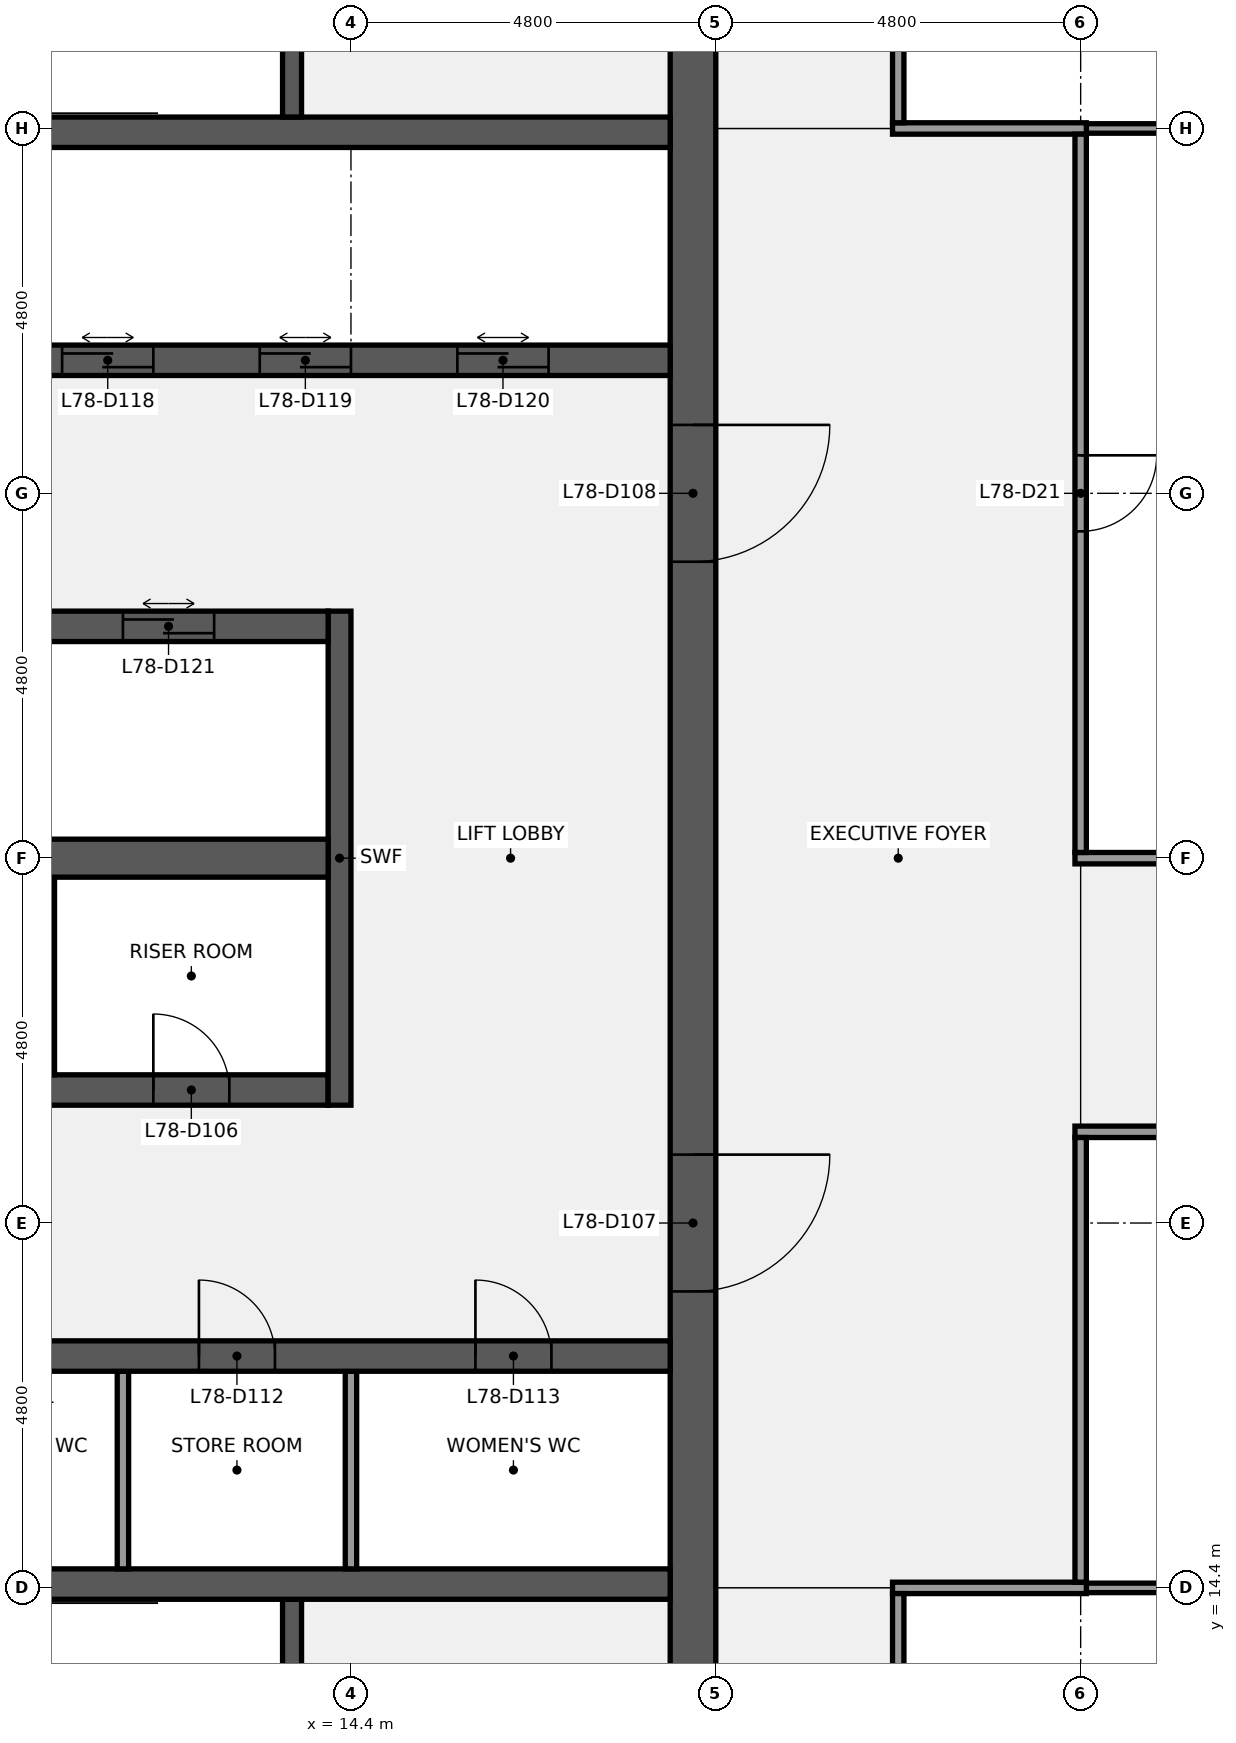
"""IFC4 building model, lengths in metres.
Left out: names, types, materials, properties, quantities, classifications, styles, units other than length and angle.
Written with IfcOpenShell. Run it as: python <this file> out.ifc"""

import sys

from ifc_helpers import new_model, si_unit, direction, frame, frame_2d, origin, place, context, subcontext, project, spatial, rectangle, extrude, element, fill, save


model = new_model("IFC4")
c1 = context("Model", 3, precision=1e-05, world=origin(), true_north=direction((0.0, 1.0)))
c2 = subcontext(c1, "Body", "Model", "MODEL_VIEW")
j1 = project(units=[si_unit("LENGTHUNIT", "METRE"), si_unit("PLANEANGLEUNIT", "RADIAN")], contexts=[c1])
p1 = place(None, origin())
s1 = spatial("IfcSite", under=j1, at=p1, CompositionType="ELEMENT")
p2 = place(p1, origin())
s2 = spatial("IfcBuilding", under=s1, at=p2, CompositionType="ELEMENT")
p3 = place(p2, frame((0.0, 0.0, 350.3)))
s3 = spatial("IfcBuildingStorey", under=s2, at=p3, CompositionType="ELEMENT", Elevation=350.3)
p4 = place(p3, frame((18.9, 38.4, 0.0), z_axis=(0.0, 0.0, 1.0), x_axis=(0.0, -1.0, 0.0)))
e1 = element("IfcWall", 1, at=p4, inside=s3, PredefinedType="SHEAR", context=c2, shape_type="SweptSolid", body=[
    extrude(rectangle(XDim=28.8, YDim=0.6, at=frame_2d((14.4, 0.0))), origin(), (0.0, 0.0, 1.0), 3.75),
])
p5 = place(p4, frame((18.3, 0.0, 0.0)))
e2 = element("IfcOpeningElement", 2, at=p5, cuts=e1, PredefinedType="OPENING", context=c2, shape_type="SweptSolid", body=[
    extrude(rectangle(XDim=1.8, YDim=2.1, at=frame_2d((0.9, 1.05))), frame((0.0, 0.31, 0.0), z_axis=(0.0, -1.0, 0.0), x_axis=(1.0, 0.0, 0.0)), (0.0, 0.0, 1.0), 0.62),
])
p6 = place(p4, frame((8.7, 0.0, 0.0)))
e3 = element("IfcOpeningElement", 3, at=p6, cuts=e1, PredefinedType="OPENING", context=c2, shape_type="SweptSolid", body=[
    extrude(rectangle(XDim=1.8, YDim=2.1, at=frame_2d((0.9, 1.05))), frame((0.0, 0.31, 0.0), z_axis=(0.0, -1.0, 0.0), x_axis=(1.0, 0.0, 0.0)), (0.0, 0.0, 1.0), 0.62),
])
p7 = place(p3, frame((13.625, 10.8, 0.0), z_axis=(0.0, 0.0, 1.0), x_axis=(0.0, 1.0, 0.0)))
e4 = element("IfcWall", 4, at=p7, inside=s3, PredefinedType="SHEAR", context=c2, shape_type="SweptSolid", body=[
    extrude(rectangle(XDim=3.45, YDim=0.25, at=frame_2d((1.725, 0.0))), origin(), (0.0, 0.0, 1.0), 3.75),
])
p8 = place(p7, frame((1.175, 0.0, 0.0)))
e5 = element("IfcOpeningElement", 5, at=p8, cuts=e4, PredefinedType="OPENING", context=c2, shape_type="SweptSolid", body=[
    extrude(rectangle(XDim=1.1, YDim=2.1, at=frame_2d((0.55, 1.05))), frame((0.0, 0.135, 0.0), z_axis=(0.0, -1.0, 0.0), x_axis=(1.0, 0.0, 0.0)), (0.0, 0.0, 1.0), 0.27),
])
p9 = place(p3, frame((0.6, 14.45, 0.0), z_axis=(0.0, 0.0, 1.0), x_axis=(1.0, 0.0, 0.0)))
e6 = element("IfcWall", 6, at=p9, inside=s3, PredefinedType="SHEAR", context=c2, shape_type="SweptSolid", body=[
    extrude(rectangle(XDim=18.0, YDim=0.4, at=frame_2d((9.0, 0.0))), origin(), (0.0, 0.0, 1.0), 3.75),
])
for number, where, z_axis, x_axis in (
    (7, (11.4, 14.65, 0.0), (0.0, 0.0, 1.0), (0.0, 1.0, 0.0)),
    (8, (14.4, 14.65, 0.0), (0.0, 0.0, 1.0), (0.0, 1.0, 0.0)),
):
    element("IfcWall", number, at=place(p3, frame(where, z_axis=z_axis, x_axis=x_axis)), inside=s3, PredefinedType="PARTITIONING", context=c2, shape_type="SweptSolid", body=[
        extrude(rectangle(XDim=2.6, YDim=0.15, at=frame_2d((1.3, 0.0))), origin(), (0.0, 0.0, 1.0), 3.75),
    ])
p10 = place(p3, frame((0.6, 17.45, 0.0), z_axis=(0.0, 0.0, 1.0), x_axis=(1.0, 0.0, 0.0)))
e9 = element("IfcWall", 9, at=p10, inside=s3, PredefinedType="SHEAR", context=c2, shape_type="SweptSolid", body=[
    extrude(rectangle(XDim=18.0, YDim=0.4, at=frame_2d((9.0, 0.0))), origin(), (0.0, 0.0, 1.0), 3.75),
])
p11 = place(p10, frame((0.962, 0.0, 0.0)))
e10 = element("IfcOpeningElement", 10, at=p11, cuts=e9, PredefinedType="OPENING", context=c2, shape_type="SweptSolid", body=[
    extrude(rectangle(XDim=1.0, YDim=2.1, at=frame_2d((0.5, 1.05))), frame((0.0, 0.21, 0.0), z_axis=(0.0, -1.0, 0.0), x_axis=(1.0, 0.0, 0.0)), (0.0, 0.0, 1.0), 0.42),
])
p12 = place(p10, frame((4.9, 0.0, 0.0)))
e11 = element("IfcOpeningElement", 11, at=p12, cuts=e9, PredefinedType="OPENING", context=c2, shape_type="SweptSolid", body=[
    extrude(rectangle(XDim=1.0, YDim=2.1, at=frame_2d((0.5, 1.05))), frame((0.0, 0.21, 0.0), z_axis=(0.0, -1.0, 0.0), x_axis=(1.0, 0.0, 0.0)), (0.0, 0.0, 1.0), 0.42),
])
p13 = place(p10, frame((8.8, 0.0, 0.0)))
e12 = element("IfcOpeningElement", 12, at=p13, cuts=e9, PredefinedType="OPENING", context=c2, shape_type="SweptSolid", body=[
    extrude(rectangle(XDim=1.0, YDim=2.1, at=frame_2d((0.5, 1.05))), frame((0.0, 0.21, 0.0), z_axis=(0.0, -1.0, 0.0), x_axis=(1.0, 0.0, 0.0)), (0.0, 0.0, 1.0), 0.42),
])
p14 = place(p10, frame((11.8, 0.0, 0.0)))
e13 = element("IfcOpeningElement", 13, at=p14, cuts=e9, PredefinedType="OPENING", context=c2, shape_type="SweptSolid", body=[
    extrude(rectangle(XDim=1.0, YDim=2.1, at=frame_2d((0.5, 1.05))), frame((0.0, 0.21, 0.0), z_axis=(0.0, -1.0, 0.0), x_axis=(1.0, 0.0, 0.0)), (0.0, 0.0, 1.0), 0.42),
])
p15 = place(p10, frame((15.438, 0.0, 0.0)))
e14 = element("IfcOpeningElement", 14, at=p15, cuts=e9, PredefinedType="OPENING", context=c2, shape_type="SweptSolid", body=[
    extrude(rectangle(XDim=1.0, YDim=2.1, at=frame_2d((0.5, 1.05))), frame((0.0, 0.21, 0.0), z_axis=(0.0, -1.0, 0.0), x_axis=(1.0, 0.0, 0.0)), (0.0, 0.0, 1.0), 0.42),
])
p16 = place(p3, frame((0.6, 20.95, 0.0), z_axis=(0.0, 0.0, 1.0), x_axis=(1.0, 0.0, 0.0)))
e15 = element("IfcWall", 15, at=p16, inside=s3, PredefinedType="SHEAR", context=c2, shape_type="SweptSolid", body=[
    extrude(rectangle(XDim=13.5, YDim=0.4, at=frame_2d((6.75, 0.0))), origin(), (0.0, 0.0, 1.0), 3.75),
])
p17 = place(p16, frame((6.25, 0.0, 0.0)))
e16 = element("IfcOpeningElement", 16, at=p17, cuts=e15, PredefinedType="OPENING", context=c2, shape_type="SweptSolid", body=[
    extrude(rectangle(XDim=1.1, YDim=2.1, at=frame_2d((0.55, 1.05))), frame((0.0, 0.21, 0.0), z_axis=(0.0, -1.0, 0.0), x_axis=(1.0, 0.0, 0.0)), (0.0, 0.0, 1.0), 0.42),
])
p18 = place(p16, frame((11.2, 0.0, 0.0)))
e17 = element("IfcOpeningElement", 17, at=p18, cuts=e15, PredefinedType="OPENING", context=c2, shape_type="SweptSolid", body=[
    extrude(rectangle(XDim=1.0, YDim=2.1, at=frame_2d((0.5, 1.05))), frame((0.0, 0.21, 0.0), z_axis=(0.0, -1.0, 0.0), x_axis=(1.0, 0.0, 0.0)), (0.0, 0.0, 1.0), 0.42),
])
p19 = place(p3, frame((14.25, 20.75, 0.0), z_axis=(0.0, 0.0, 1.0), x_axis=(0.0, 1.0, 0.0)))
e18 = element("IfcWall", 18, at=p19, inside=s3, PredefinedType="SHEAR", context=c2, shape_type="SweptSolid", body=[
    extrude(rectangle(XDim=6.5, YDim=0.3, at=frame_2d((3.25, 0.0))), origin(), (0.0, 0.0, 1.0), 3.75),
])
p20 = place(p3, frame((10.3, 21.15, 0.0), z_axis=(0.0, 0.0, 1.0), x_axis=(0.0, 1.0, 0.0)))
e19 = element("IfcWall", 19, at=p20, inside=s3, PredefinedType="SHEAR", context=c2, shape_type="SweptSolid", body=[
    extrude(rectangle(XDim=2.6, YDim=0.4, at=frame_2d((1.3, 0.0))), origin(), (0.0, 0.0, 1.0), 3.75),
])
p21 = place(p3, frame((0.6, 24.0, 0.0), z_axis=(0.0, 0.0, 1.0), x_axis=(1.0, 0.0, 0.0)))
e20 = element("IfcWall", 20, at=p21, inside=s3, PredefinedType="SHEAR", context=c2, shape_type="SweptSolid", body=[
    extrude(rectangle(XDim=13.5, YDim=0.5, at=frame_2d((6.75, 0.0))), origin(), (0.0, 0.0, 1.0), 3.75),
])
p22 = place(p3, frame((0.6, 27.05, 0.0), z_axis=(0.0, 0.0, 1.0), x_axis=(1.0, 0.0, 0.0)))
e21 = element("IfcWall", 21, at=p22, inside=s3, PredefinedType="SHEAR", context=c2, shape_type="SweptSolid", body=[
    extrude(rectangle(XDim=13.5, YDim=0.4, at=frame_2d((6.75, 0.0))), origin(), (0.0, 0.0, 1.0), 3.75),
])
p23 = place(p22, frame((3.85, 0.0, 0.0)))
e22 = element("IfcOpeningElement", 22, at=p23, cuts=e21, PredefinedType="OPENING", context=c2, shape_type="SweptSolid", body=[
    extrude(rectangle(XDim=1.0, YDim=2.1, at=frame_2d((0.5, 1.05))), frame((0.0, 0.21, 0.0), z_axis=(0.0, -1.0, 0.0), x_axis=(1.0, 0.0, 0.0)), (0.0, 0.0, 1.0), 0.42),
])
p24 = place(p22, frame((10.8, 0.0, 0.0)))
e23 = element("IfcOpeningElement", 23, at=p24, cuts=e21, PredefinedType="OPENING", context=c2, shape_type="SweptSolid", body=[
    extrude(rectangle(XDim=1.2, YDim=2.1, at=frame_2d((0.6, 1.05))), frame((0.0, 0.21, 0.0), z_axis=(0.0, -1.0, 0.0), x_axis=(1.0, 0.0, 0.0)), (0.0, 0.0, 1.0), 0.42),
])
p25 = place(p3, frame((0.6, 30.55, 0.0), z_axis=(0.0, 0.0, 1.0), x_axis=(1.0, 0.0, 0.0)))
e24 = element("IfcWall", 24, at=p25, inside=s3, PredefinedType="SHEAR", context=c2, shape_type="SweptSolid", body=[
    extrude(rectangle(XDim=18.0, YDim=0.4, at=frame_2d((9.0, 0.0))), origin(), (0.0, 0.0, 1.0), 3.75),
])
p26 = place(p25, frame((1.6, 0.0, 0.0)))
e25 = element("IfcOpeningElement", 25, at=p26, cuts=e24, PredefinedType="OPENING", context=c2, shape_type="SweptSolid", body=[
    extrude(rectangle(XDim=1.2, YDim=2.1, at=frame_2d((0.6, 1.05))), frame((0.0, 0.21, 0.0), z_axis=(0.0, -1.0, 0.0), x_axis=(1.0, 0.0, 0.0)), (0.0, 0.0, 1.0), 0.42),
])
p27 = place(p25, frame((4.2, 0.0, 0.0)))
e26 = element("IfcOpeningElement", 26, at=p27, cuts=e24, PredefinedType="OPENING", context=c2, shape_type="SweptSolid", body=[
    extrude(rectangle(XDim=1.2, YDim=2.1, at=frame_2d((0.6, 1.05))), frame((0.0, 0.21, 0.0), z_axis=(0.0, -1.0, 0.0), x_axis=(1.0, 0.0, 0.0)), (0.0, 0.0, 1.0), 0.42),
])
p28 = place(p25, frame((6.8, 0.0, 0.0)))
e27 = element("IfcOpeningElement", 27, at=p28, cuts=e24, PredefinedType="OPENING", context=c2, shape_type="SweptSolid", body=[
    extrude(rectangle(XDim=1.2, YDim=2.1, at=frame_2d((0.6, 1.05))), frame((0.0, 0.21, 0.0), z_axis=(0.0, -1.0, 0.0), x_axis=(1.0, 0.0, 0.0)), (0.0, 0.0, 1.0), 0.42),
])
p29 = place(p25, frame((10.0, 0.0, 0.0)))
e28 = element("IfcOpeningElement", 28, at=p29, cuts=e24, PredefinedType="OPENING", context=c2, shape_type="SweptSolid", body=[
    extrude(rectangle(XDim=1.2, YDim=2.1, at=frame_2d((0.6, 1.05))), frame((0.0, 0.21, 0.0), z_axis=(0.0, -1.0, 0.0), x_axis=(1.0, 0.0, 0.0)), (0.0, 0.0, 1.0), 0.42),
])
p30 = place(p25, frame((12.6, 0.0, 0.0)))
e29 = element("IfcOpeningElement", 29, at=p30, cuts=e24, PredefinedType="OPENING", context=c2, shape_type="SweptSolid", body=[
    extrude(rectangle(XDim=1.2, YDim=2.1, at=frame_2d((0.6, 1.05))), frame((0.0, 0.21, 0.0), z_axis=(0.0, -1.0, 0.0), x_axis=(1.0, 0.0, 0.0)), (0.0, 0.0, 1.0), 0.42),
])
p31 = place(p25, frame((15.2, 0.0, 0.0)))
e30 = element("IfcOpeningElement", 30, at=p31, cuts=e24, PredefinedType="OPENING", context=c2, shape_type="SweptSolid", body=[
    extrude(rectangle(XDim=1.2, YDim=2.1, at=frame_2d((0.6, 1.05))), frame((0.0, 0.21, 0.0), z_axis=(0.0, -1.0, 0.0), x_axis=(1.0, 0.0, 0.0)), (0.0, 0.0, 1.0), 0.42),
])
p32 = place(p3, frame((0.6, 33.55, 0.0), z_axis=(0.0, 0.0, 1.0), x_axis=(1.0, 0.0, 0.0)))
e31 = element("IfcWall", 31, at=p32, inside=s3, PredefinedType="SHEAR", context=c2, shape_type="SweptSolid", body=[
    extrude(rectangle(XDim=18.0, YDim=0.4, at=frame_2d((9.0, 0.0))), origin(), (0.0, 0.0, 1.0), 3.75),
])
p33 = place(p3, frame((13.625, 33.75, 0.0), z_axis=(0.0, 0.0, 1.0), x_axis=(0.0, 1.0, 0.0)))
e32 = element("IfcWall", 32, at=p33, inside=s3, PredefinedType="SHEAR", context=c2, shape_type="SweptSolid", body=[
    extrude(rectangle(XDim=3.45, YDim=0.25, at=frame_2d((1.725, 0.0))), origin(), (0.0, 0.0, 1.0), 3.75),
])
p34 = place(p33, frame((1.175, 0.0, 0.0)))
e33 = element("IfcOpeningElement", 33, at=p34, cuts=e32, PredefinedType="OPENING", context=c2, shape_type="SweptSolid", body=[
    extrude(rectangle(XDim=1.1, YDim=2.1, at=frame_2d((0.55, 1.05))), frame((0.0, 0.135, 0.0), z_axis=(0.0, -1.0, 0.0), x_axis=(1.0, 0.0, 0.0)), (0.0, 0.0, 1.0), 0.27),
])
p35 = place(p3, frame((24.075, 14.4, 0.0), z_axis=(0.0, 0.0, 1.0), x_axis=(1.0, 0.0, 0.0)))
e34 = element("IfcWall", 34, at=p35, inside=s3, PredefinedType="PARTITIONING", context=c2, shape_type="SweptSolid", body=[
    extrude(rectangle(XDim=9.6, YDim=0.125, at=frame_2d((4.8, 0.0))), origin(), (0.0, 0.0, 1.0), 2.759),
])
p36 = place(p3, frame((21.525, 14.4, 0.0), z_axis=(0.0, 0.0, 1.0), x_axis=(1.0, 0.0, 0.0)))
e35 = element("IfcWall", 35, at=p36, inside=s3, PredefinedType="PARTITIONING", context=c2, shape_type="SweptSolid", body=[
    extrude(rectangle(XDim=2.55, YDim=0.15, at=frame_2d((1.275, 0.0))), origin(), (0.0, 0.0, 1.0), 2.759),
])
p37 = place(p3, frame((23.925, 20.4, 0.0), z_axis=(0.0, 0.0, 1.0), x_axis=(1.0, 0.0, 0.0)))
e36 = element("IfcWall", 36, at=p37, inside=s3, PredefinedType="PARTITIONING", context=c2, shape_type="SweptSolid", body=[
    extrude(rectangle(XDim=9.75, YDim=0.15, at=frame_2d((4.875, 0.0))), origin(), (0.0, 0.0, 1.0), 2.759),
])
p38 = place(p37, frame((4.375, 0.0, 0.0)))
e37 = element("IfcOpeningElement", 37, at=p38, cuts=e36, PredefinedType="OPENING", context=c2, shape_type="SweptSolid", body=[
    extrude(rectangle(XDim=1.0, YDim=2.1, at=frame_2d((0.5, 1.05))), frame((0.0, 0.085, 0.0), z_axis=(0.0, -1.0, 0.0), x_axis=(1.0, 0.0, 0.0)), (0.0, 0.0, 1.0), 0.17),
])
p39 = place(p3, frame((23.925, 24.0, 0.0), z_axis=(0.0, 0.0, 1.0), x_axis=(1.0, 0.0, 0.0)))
e38 = element("IfcWall", 38, at=p39, inside=s3, PredefinedType="PARTITIONING", context=c2, shape_type="SweptSolid", body=[
    extrude(rectangle(XDim=9.75, YDim=0.15, at=frame_2d((4.875, 0.0))), origin(), (0.0, 0.0, 1.0), 2.759),
])
p40 = place(p3, frame((24.075, 33.6, 0.0), z_axis=(0.0, 0.0, 1.0), x_axis=(1.0, 0.0, 0.0)))
e39 = element("IfcWall", 39, at=p40, inside=s3, PredefinedType="PARTITIONING", context=c2, shape_type="SweptSolid", body=[
    extrude(rectangle(XDim=9.6, YDim=0.125, at=frame_2d((4.8, 0.0))), origin(), (0.0, 0.0, 1.0), 2.759),
])
p41 = place(p3, frame((21.525, 33.6, 0.0), z_axis=(0.0, 0.0, 1.0), x_axis=(1.0, 0.0, 0.0)))
e40 = element("IfcWall", 40, at=p41, inside=s3, PredefinedType="PARTITIONING", context=c2, shape_type="SweptSolid", body=[
    extrude(rectangle(XDim=2.55, YDim=0.15, at=frame_2d((1.275, 0.0))), origin(), (0.0, 0.0, 1.0), 2.759),
])
for number, where, z_axis, x_axis in (
    (41, (21.6, 9.675, 0.0), (0.0, 0.0, 1.0), (0.0, 1.0, 0.0)),
    (42, (21.6, 33.675, 0.0), (0.0, 0.0, 1.0), (0.0, 1.0, 0.0)),
):
    element("IfcWall", number, at=place(p3, frame(where, z_axis=z_axis, x_axis=x_axis)), inside=s3, PredefinedType="PARTITIONING", context=c2, shape_type="SweptSolid", body=[
        extrude(rectangle(XDim=4.65, YDim=0.15, at=frame_2d((2.325, 0.0))), origin(), (0.0, 0.0, 1.0), 2.759),
    ])
p42 = place(p3, frame((24.0, 14.475, 0.0), z_axis=(0.0, 0.0, 1.0), x_axis=(0.0, 1.0, 0.0)))
e43 = element("IfcWall", 43, at=p42, inside=s3, PredefinedType="PARTITIONING", context=c2, shape_type="SweptSolid", body=[
    extrude(rectangle(XDim=5.85, YDim=0.15, at=frame_2d((2.925, 0.0))), origin(), (0.0, 0.0, 1.0), 2.759),
])
p43 = place(p3, frame((24.0, 24.075, 0.0), z_axis=(0.0, 0.0, 1.0), x_axis=(0.0, 1.0, 0.0)))
e44 = element("IfcWall", 44, at=p43, inside=s3, PredefinedType="PARTITIONING", context=c2, shape_type="SweptSolid", body=[
    extrude(rectangle(XDim=9.45, YDim=0.15, at=frame_2d((4.725, 0.0))), origin(), (0.0, 0.0, 1.0), 2.759),
])
p44 = place(p43, frame((4.225, 0.0, 0.0)))
e45 = element("IfcOpeningElement", 45, at=p44, cuts=e44, PredefinedType="OPENING", context=c2, shape_type="SweptSolid", body=[
    extrude(rectangle(XDim=1.0, YDim=2.1, at=frame_2d((0.5, 1.05))), frame((0.0, 0.085, 0.0), z_axis=(0.0, -1.0, 0.0), x_axis=(1.0, 0.0, 0.0)), (0.0, 0.0, 1.0), 0.17),
])
p45 = place(p18, origin())
e46 = element("IfcDoor", 46, at=p45, inside=s3, OperationType="SINGLE_SWING_LEFT", PredefinedType="DOOR", context=c2, shape_type="SweptSolid", body=[
    extrude(rectangle(XDim=1.0, YDim=2.1, at=frame_2d((0.5, 1.05))), frame((0.0, 0.025, 0.0), z_axis=(0.0, -1.0, 0.0), x_axis=(1.0, 0.0, 0.0)), (0.0, 0.0, 1.0), 0.05),
])
fill(e17, e46)
p46 = place(p5, origin())
e47 = element("IfcDoor", 47, at=p46, inside=s3, OperationType="DOUBLE_DOOR_SINGLE_SWING", PredefinedType="DOOR", context=c2, shape_type="SweptSolid", body=[
    extrude(rectangle(XDim=1.8, YDim=2.1, at=frame_2d((0.9, 1.05))), frame((0.0, 0.025, 0.0), z_axis=(0.0, -1.0, 0.0), x_axis=(1.0, 0.0, 0.0)), (0.0, 0.0, 1.0), 0.05),
])
fill(e2, e47)
p47 = place(p6, origin())
e48 = element("IfcDoor", 48, at=p47, inside=s3, OperationType="DOUBLE_DOOR_SINGLE_SWING", PredefinedType="DOOR", context=c2, shape_type="SweptSolid", body=[
    extrude(rectangle(XDim=1.8, YDim=2.1, at=frame_2d((0.9, 1.05))), frame((0.0, 0.025, 0.0), z_axis=(0.0, -1.0, 0.0), x_axis=(1.0, 0.0, 0.0)), (0.0, 0.0, 1.0), 0.05),
])
fill(e3, e48)
p48 = place(p14, origin())
e49 = element("IfcDoor", 49, at=p48, inside=s3, OperationType="SINGLE_SWING_LEFT", PredefinedType="DOOR", context=c2, shape_type="SweptSolid", body=[
    extrude(rectangle(XDim=1.0, YDim=2.1, at=frame_2d((0.5, 1.05))), frame((0.0, 0.025, 0.0), z_axis=(0.0, -1.0, 0.0), x_axis=(1.0, 0.0, 0.0)), (0.0, 0.0, 1.0), 0.05),
])
fill(e13, e49)
p49 = place(p15, origin())
e50 = element("IfcDoor", 50, at=p49, inside=s3, OperationType="SINGLE_SWING_LEFT", PredefinedType="DOOR", context=c2, shape_type="SweptSolid", body=[
    extrude(rectangle(XDim=1.0, YDim=2.1, at=frame_2d((0.5, 1.05))), frame((0.0, 0.025, 0.0), z_axis=(0.0, -1.0, 0.0), x_axis=(1.0, 0.0, 0.0)), (0.0, 0.0, 1.0), 0.05),
])
fill(e14, e50)
p50 = place(p29, origin())
e51 = element("IfcDoor", 51, at=p50, inside=s3, OperationType="DOUBLE_DOOR_SLIDING", PredefinedType="DOOR", context=c2, shape_type="SweptSolid", body=[
    extrude(rectangle(XDim=1.2, YDim=2.1, at=frame_2d((0.6, 1.05))), frame((0.0, 0.025, 0.0), z_axis=(0.0, -1.0, 0.0), x_axis=(1.0, 0.0, 0.0)), (0.0, 0.0, 1.0), 0.05),
])
fill(e28, e51)
p51 = place(p30, origin())
e52 = element("IfcDoor", 52, at=p51, inside=s3, OperationType="DOUBLE_DOOR_SLIDING", PredefinedType="DOOR", context=c2, shape_type="SweptSolid", body=[
    extrude(rectangle(XDim=1.2, YDim=2.1, at=frame_2d((0.6, 1.05))), frame((0.0, 0.025, 0.0), z_axis=(0.0, -1.0, 0.0), x_axis=(1.0, 0.0, 0.0)), (0.0, 0.0, 1.0), 0.05),
])
fill(e29, e52)
p52 = place(p31, origin())
e53 = element("IfcDoor", 53, at=p52, inside=s3, OperationType="DOUBLE_DOOR_SLIDING", PredefinedType="DOOR", context=c2, shape_type="SweptSolid", body=[
    extrude(rectangle(XDim=1.2, YDim=2.1, at=frame_2d((0.6, 1.05))), frame((0.0, 0.025, 0.0), z_axis=(0.0, -1.0, 0.0), x_axis=(1.0, 0.0, 0.0)), (0.0, 0.0, 1.0), 0.05),
])
fill(e30, e53)
p53 = place(p24, origin())
e54 = element("IfcDoor", 54, at=p53, inside=s3, OperationType="DOUBLE_DOOR_SLIDING", PredefinedType="DOOR", context=c2, shape_type="SweptSolid", body=[
    extrude(rectangle(XDim=1.2, YDim=2.1, at=frame_2d((0.6, 1.05))), frame((0.0, 0.025, 0.0), z_axis=(0.0, -1.0, 0.0), x_axis=(1.0, 0.0, 0.0)), (0.0, 0.0, 1.0), 0.05),
])
fill(e23, e54)
p54 = place(p44, origin())
e55 = element("IfcDoor", 55, at=p54, inside=s3, OperationType="SINGLE_SWING_RIGHT", PredefinedType="DOOR", context=c2, shape_type="SweptSolid", body=[
    extrude(rectangle(XDim=1.0, YDim=2.1, at=frame_2d((0.5, 1.05))), frame((0.0, 0.025, 0.0), z_axis=(0.0, -1.0, 0.0), x_axis=(1.0, 0.0, 0.0)), (0.0, 0.0, 1.0), 0.05),
])
fill(e45, e55)
save(model, sys.argv[1])
